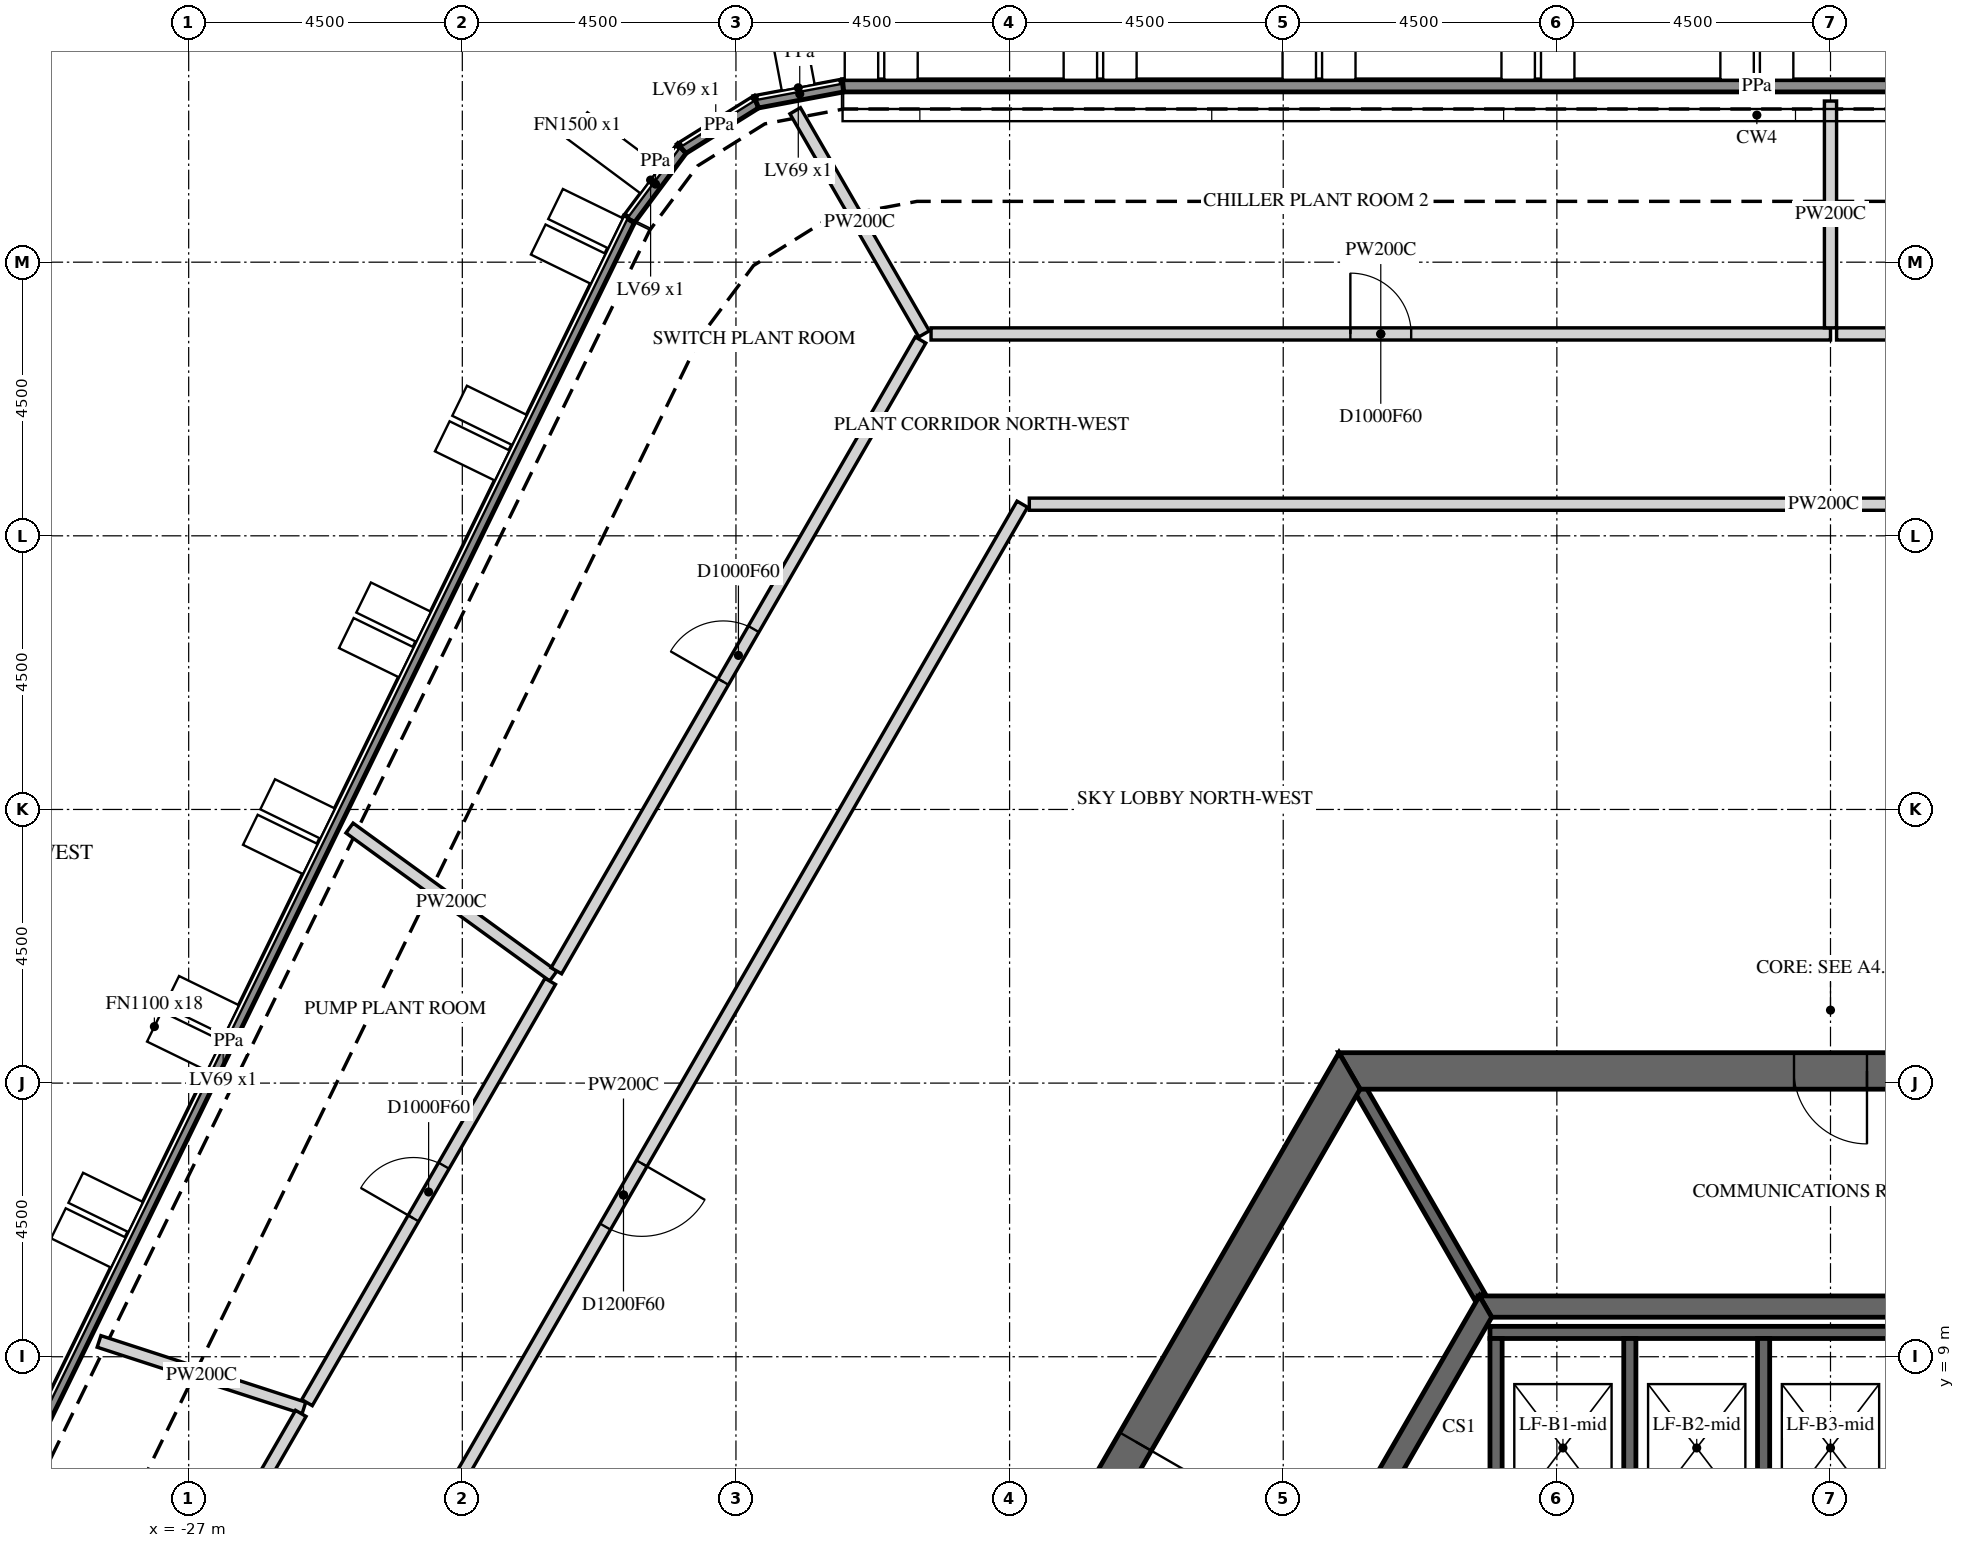
"""IFC4 building model, lengths in metres.
Left out: names, types, materials, properties, quantities, classifications, styles, units other than length and angle.
Written with IfcOpenShell. Run it as: python <this file> out.ifc"""

import sys

from ifc_helpers import new_model, si_unit, direction, frame, frame_2d, origin, place, context, subcontext, project, spatial, polyline, rectangle, outline, extrude, element, fill, save


model = new_model("IFC4")
c1 = context("Model", 3, precision=1e-05, world=origin(), true_north=direction((0.0, 1.0)))
c2 = subcontext(c1, "Body", "Model", "MODEL_VIEW")
j1 = project(units=[si_unit("LENGTHUNIT", "METRE"), si_unit("PLANEANGLEUNIT", "RADIAN")], contexts=[c1])
p1 = place(None, origin())
s1 = spatial("IfcSite", under=j1, at=p1, CompositionType="ELEMENT")
p2 = place(p1, origin())
s2 = spatial("IfcBuilding", under=s1, at=p2, CompositionType="ELEMENT")
p3 = place(p2, frame((0.0, 0.0, 146.7)))
s3 = spatial("IfcBuildingStorey", under=s2, at=p3, CompositionType="ELEMENT", Elevation=146.7)
p4 = place(p3, frame((-32.931, 0.689, 5.7), z_axis=(0.0, 0.0, 1.0), x_axis=(0.438369694316, 0.898794754716, 0.0)))
e1 = element("IfcWall", 1, at=p4, inside=s3, PredefinedType="PARAPET", context=c2, shape_type="SweptSolid", body=[
    extrude(outline(polyline([(0.008, -0.1), (30.044, -0.1), (30.063, 0.1), (-0.008, 0.1), (0.008, -0.1)])), origin(), (0.0, 0.0, 1.0), 1.1),
])
p5 = place(p3, frame((-19.756, 27.701, 5.7), z_axis=(0.0, 0.0, 1.0), x_axis=(0.597118923952, 0.802152722777, 0.0)))
e2 = element("IfcWall", 2, at=p5, inside=s3, PredefinedType="PARAPET", context=c2, shape_type="SweptSolid", body=[
    extrude(outline(polyline([(0.009, -0.1), (1.434, -0.1), (1.471, 0.1), (-0.009, 0.1), (0.009, -0.1)])), origin(), (0.0, 0.0, 1.0), 1.1),
])
p6 = place(p3, frame((-18.889, 28.866, 5.7), z_axis=(0.0, 0.0, 1.0), x_axis=(0.848083831846, 0.529862070884, 0.0)))
e3 = element("IfcWall", 3, at=p6, inside=s3, PredefinedType="PARAPET", context=c2, shape_type="SweptSolid", body=[
    extrude(outline(polyline([(0.019, -0.1), (1.424, -0.1), (1.462, 0.1), (-0.019, 0.1), (0.019, -0.1)])), origin(), (0.0, 0.0, 1.0), 1.1),
])
p7 = place(p3, frame((-17.665, 29.631, 5.7), z_axis=(0.0, 0.0, 1.0), x_axis=(0.982729187844, 0.185049570005, 0.0)))
e4 = element("IfcWall", 4, at=p7, inside=s3, PredefinedType="PARAPET", context=c2, shape_type="SweptSolid", body=[
    extrude(outline(polyline([(0.019, -0.1), (1.443, -0.1), (1.462, 0.1), (-0.019, 0.1), (0.019, -0.1)])), origin(), (0.0, 0.0, 1.0), 1.1),
])
p8 = place(p3, frame((-16.237, 29.9, 5.7), z_axis=(0.0, 0.0, 1.0), x_axis=(1.0, 0.0, 0.0)))
e5 = element("IfcWall", 5, at=p8, inside=s3, PredefinedType="PARAPET", context=c2, shape_type="SweptSolid", body=[
    extrude(outline(polyline([(0.009, -0.1), (30.045, -0.1), (30.062, 0.1), (-0.009, 0.1), (0.009, -0.1)])), origin(), (0.0, 0.0, 1.0), 1.1),
])
p9 = place(p3, frame((-7.91, 13.7, -0.3), z_axis=(0.0, 0.0, 1.0), x_axis=(-0.499999880136, -0.866025472988, 0.0)))
e6 = element("IfcWall", 6, at=p9, inside=s3, PredefinedType="SHEAR", context=c2, shape_type="SweptSolid", body=[
    extrude(outline(polyline([(-0.173, -0.3), (15.993, -0.3), (15.646, 0.3), (0.173, 0.3), (-0.173, -0.3)])), origin(), (0.0, 0.0, 1.0), 5.8),
])
p10 = place(p9, frame((7.039, 0.0, 0.3)))
e7 = element("IfcOpeningElement", 7, at=p10, cuts=e6, PredefinedType="OPENING", context=c2, shape_type="SweptSolid", body=[
    extrude(rectangle(XDim=1.8, YDim=2.4, at=frame_2d((0.9, 1.2))), frame((0.0, 0.31, 0.0), z_axis=(0.0, -1.0, 0.0), x_axis=(1.0, 0.0, 0.0)), (0.0, 0.0, 1.0), 0.62),
])
p11 = place(p3, frame((7.91, 13.7, -0.3), z_axis=(0.0, 0.0, 1.0), x_axis=(-1.0, 0.0, 0.0)))
e8 = element("IfcWall", 8, at=p11, inside=s3, PredefinedType="SHEAR", context=c2, shape_type="SweptSolid", body=[
    extrude(outline(polyline([(-0.173, -0.3), (15.993, -0.3), (15.646, 0.3), (0.173, 0.3), (-0.173, -0.3)])), origin(), (0.0, 0.0, 1.0), 5.8),
])
p12 = place(p11, frame((7.31, 0.0, 0.3)))
e9 = element("IfcOpeningElement", 9, at=p12, cuts=e8, PredefinedType="OPENING", context=c2, shape_type="SweptSolid", body=[
    extrude(rectangle(XDim=1.2, YDim=2.4, at=frame_2d((0.6, 1.2))), frame((0.0, 0.31, 0.0), z_axis=(0.0, -1.0, 0.0), x_axis=(1.0, 0.0, 0.0)), (0.0, 0.0, 1.0), 0.62),
])
p13 = place(p3, frame((-5.673, 9.825, -0.3), z_axis=(0.0, 0.0, 1.0), x_axis=(-0.499995046907, -0.866028263435, 0.0)))
e10 = element("IfcWall", 10, at=p13, inside=s3, PredefinedType="SHEAR", context=c2, shape_type="SweptSolid", body=[
    extrude(outline(polyline([(-0.101, -0.175), (11.446, -0.175), (11.244, 0.175), (0.101, 0.175), (-0.101, -0.175)])), origin(), (0.0, 0.0, 1.0), 5.8),
])
p14 = place(p13, frame((4.801, 0.0, 0.3)))
e11 = element("IfcOpeningElement", 11, at=p14, cuts=e10, PredefinedType="OPENING", context=c2, shape_type="SweptSolid", body=[
    extrude(rectangle(XDim=1.8, YDim=2.4, at=frame_2d((0.9, 1.2))), frame((0.0, 0.185, 0.0), z_axis=(0.0, -1.0, 0.0), x_axis=(1.0, 0.0, 0.0)), (0.0, 0.0, 1.0), 0.37),
])
p15 = place(p3, frame((5.673, 9.825, -0.3), z_axis=(0.0, 0.0, 1.0), x_axis=(-1.0, 0.0, 0.0)))
e12 = element("IfcWall", 12, at=p15, inside=s3, PredefinedType="SHEAR", context=c2, shape_type="SweptSolid", body=[
    extrude(outline(polyline([(-0.101, -0.175), (11.446, -0.175), (11.244, 0.175), (0.101, 0.175), (-0.101, -0.175)])), origin(), (0.0, 0.0, 1.0), 5.8),
])
p16 = place(p3, frame((-5.6, 9.4, -0.25), z_axis=(0.0, 0.0, 1.0), x_axis=(1.0, 0.0, 0.0)))
e13 = element("IfcWall", 13, at=p16, inside=s3, PredefinedType="SHEAR", context=c2, shape_type="SweptSolid", body=[
    extrude(rectangle(XDim=11.2, YDim=0.2, at=frame_2d((5.6, 0.0))), origin(), (0.0, 0.0, 1.0), 5.75),
])
for number, where, z_axis, x_axis in (
    (14, (-5.5, 6.4, -0.25), (0.0, 0.0, 1.0), (0.0, 1.0, 0.0)),
    (15, (-3.3, 6.4, -0.25), (0.0, 0.0, 1.0), (0.0, 1.0, 0.0)),
    (16, (-1.1, 6.4, -0.25), (0.0, 0.0, 1.0), (0.0, 1.0, 0.0)),
):
    element("IfcWall", number, at=place(p3, frame(where, z_axis=z_axis, x_axis=x_axis)), inside=s3, PredefinedType="SHEAR", context=c2, shape_type="SweptSolid", body=[
        extrude(rectangle(XDim=2.9, YDim=0.2, at=frame_2d((1.45, 0.0))), origin(), (0.0, 0.0, 1.0), 5.75),
    ])
p17 = place(p3, frame((-5.773, 10.0, -0.3), z_axis=(0.0, 0.0, 1.0), x_axis=(-0.500038251005, 0.86600331843, 0.0)))
e17 = element("IfcWall", 17, at=p17, inside=s3, PredefinedType="SHEAR", context=c2, shape_type="SweptSolid", body=[
    extrude(rectangle(XDim=3.926, YDim=0.2, at=frame_2d((1.963, 0.0))), origin(), (0.0, 0.0, 1.0), 5.8),
])
p18 = place(p3, frame((-28.474, 9.252, 0.0), z_axis=(0.0, 0.0, 1.0), x_axis=(0.95105432493, -0.309023738622, 0.0)))
e18 = element("IfcWall", 18, at=p18, inside=s3, PredefinedType="PARTITIONING", context=c2, shape_type="SweptSolid", body=[
    extrude(rectangle(XDim=3.542, YDim=0.2, at=frame_2d((1.771, 0.0))), origin(), (0.0, 0.0, 1.0), 5.5),
])
p19 = place(p3, frame((-29.641, 0.3, 0.0), z_axis=(0.0, 0.0, 1.0), x_axis=(0.500005956145, 0.866021964975, 0.0)))
e19 = element("IfcWall", 19, at=p19, inside=s3, PredefinedType="PARTITIONING", context=c2, shape_type="SweptSolid", body=[
    extrude(rectangle(XDim=8.97, YDim=0.2, at=frame_2d((4.485, 0.0))), origin(), (0.0, 0.0, 1.0), 5.5),
])
p20 = place(p19, frame((3.985, 0.0, 0.0)))
e20 = element("IfcOpeningElement", 20, at=p20, cuts=e19, PredefinedType="OPENING", context=c2, shape_type="SweptSolid", body=[
    extrude(rectangle(XDim=1.0, YDim=2.1, at=frame_2d((0.5, 1.05))), frame((0.0, 0.11, 0.0), z_axis=(0.0, -1.0, 0.0), x_axis=(1.0, 0.0, 0.0)), (0.0, 0.0, 1.0), 0.22),
])
p21 = place(p3, frame((-24.355, 17.695, 0.0), z_axis=(0.0, 0.0, 1.0), x_axis=(0.809011281795, -0.587793114904, 0.0)))
e21 = element("IfcWall", 21, at=p21, inside=s3, PredefinedType="PARTITIONING", context=c2, shape_type="SweptSolid", body=[
    extrude(rectangle(XDim=4.142, YDim=0.2, at=frame_2d((2.071, 0.0))), origin(), (0.0, 0.0, 1.0), 5.5),
])
p22 = place(p3, frame((-25.054, 8.246, 0.0), z_axis=(0.0, 0.0, 1.0), x_axis=(0.50002892151, 0.866008705299, 0.0)))
e22 = element("IfcWall", 22, at=p22, inside=s3, PredefinedType="PARTITIONING", context=c2, shape_type="SweptSolid", body=[
    extrude(rectangle(XDim=7.999, YDim=0.2, at=frame_2d((4.0, 0.0))), origin(), (0.0, 0.0, 1.0), 5.5),
])
p23 = place(p22, frame((3.5, 0.0, 0.0)))
e23 = element("IfcOpeningElement", 23, at=p23, cuts=e22, PredefinedType="OPENING", context=c2, shape_type="SweptSolid", body=[
    extrude(rectangle(XDim=1.0, YDim=2.1, at=frame_2d((0.5, 1.05))), frame((0.0, 0.11, 0.0), z_axis=(0.0, -1.0, 0.0), x_axis=(1.0, 0.0, 0.0)), (0.0, 0.0, 1.0), 0.22),
])
p24 = place(p3, frame((-17.026, 29.49, 0.0), z_axis=(0.0, 0.0, 1.0), x_axis=(0.49998675294, -0.866033051843, 0.0)))
e24 = element("IfcWall", 24, at=p24, inside=s3, PredefinedType="PARTITIONING", context=c2, shape_type="SweptSolid", body=[
    extrude(rectangle(XDim=4.238, YDim=0.2, at=frame_2d((2.119, 0.0))), origin(), (0.0, 0.0, 1.0), 5.5),
])
p25 = place(p3, frame((-20.954, 15.347, 0.0), z_axis=(0.0, 0.0, 1.0), x_axis=(0.500001820933, 0.866024352466, 0.0)))
e25 = element("IfcWall", 25, at=p25, inside=s3, PredefinedType="PARTITIONING", context=c2, shape_type="SweptSolid", body=[
    extrude(rectangle(XDim=11.978, YDim=0.2, at=frame_2d((5.989, 0.0))), origin(), (0.0, 0.0, 1.0), 5.5),
])
p26 = place(p25, frame((5.489, 0.0, 0.0)))
e26 = element("IfcOpeningElement", 26, at=p26, cuts=e25, PredefinedType="OPENING", context=c2, shape_type="SweptSolid", body=[
    extrude(rectangle(XDim=1.0, YDim=2.1, at=frame_2d((0.5, 1.05))), frame((0.0, 0.11, 0.0), z_axis=(0.0, -1.0, 0.0), x_axis=(1.0, 0.0, 0.0)), (0.0, 0.0, 1.0), 0.22),
])
p27 = place(p3, frame((-13.291, 23.02, 0.0), z_axis=(0.0, 0.0, 1.0), x_axis=(-0.499987482804, -0.86603263047, 0.0)))
e27 = element("IfcWall", 27, at=p27, inside=s3, PredefinedType="PARTITIONING", context=c2, shape_type="SweptSolid", body=[
    extrude(rectangle(XDim=26.235, YDim=0.2, at=frame_2d((13.117, 0.0))), origin(), (0.0, 0.0, 1.0), 5.5),
])
p28 = place(p27, frame((12.517, 0.0, 0.0)))
e28 = element("IfcOpeningElement", 28, at=p28, cuts=e27, PredefinedType="OPENING", context=c2, shape_type="SweptSolid", body=[
    extrude(rectangle(XDim=1.2, YDim=2.1, at=frame_2d((0.6, 1.05))), frame((0.0, 0.11, 0.0), z_axis=(0.0, -1.0, 0.0), x_axis=(1.0, 0.0, 0.0)), (0.0, 0.0, 1.0), 0.22),
])
p29 = place(p3, frame((-14.792, 25.82, 0.0), z_axis=(0.0, 0.0, 1.0), x_axis=(1.0, 0.0, 0.0)))
e29 = element("IfcWall", 29, at=p29, inside=s3, PredefinedType="PARTITIONING", context=c2, shape_type="SweptSolid", body=[
    extrude(rectangle(XDim=14.792, YDim=0.2, at=frame_2d((7.396, 0.0))), origin(), (0.0, 0.0, 1.0), 5.5),
])
p30 = place(p29, frame((6.896, 0.0, 0.0)))
e30 = element("IfcOpeningElement", 30, at=p30, cuts=e29, PredefinedType="OPENING", context=c2, shape_type="SweptSolid", body=[
    extrude(rectangle(XDim=1.0, YDim=2.1, at=frame_2d((0.5, 1.05))), frame((0.0, 0.11, 0.0), z_axis=(0.0, -1.0, 0.0), x_axis=(1.0, 0.0, 0.0)), (0.0, 0.0, 1.0), 0.22),
])
p31 = place(p3, frame((0.0, 29.65, 0.0), z_axis=(0.0, 0.0, 1.0), x_axis=(0.0, -1.0, 0.0)))
e31 = element("IfcWall", 31, at=p31, inside=s3, PredefinedType="PARTITIONING", context=c2, shape_type="SweptSolid", body=[
    extrude(rectangle(XDim=3.73, YDim=0.2, at=frame_2d((1.865, 0.0))), origin(), (0.0, 0.0, 1.0), 5.5),
])
p32 = place(p3, frame((12.944, 23.02, 0.0), z_axis=(0.0, 0.0, 1.0), x_axis=(-1.0, 0.0, 0.0)))
e32 = element("IfcWall", 32, at=p32, inside=s3, PredefinedType="PARTITIONING", context=c2, shape_type="SweptSolid", body=[
    extrude(rectangle(XDim=26.12, YDim=0.2, at=frame_2d((13.06, 0.0))), origin(), (0.0, 0.0, 1.0), 5.5),
])
p33 = place(p3, frame((0.1, 25.82, 0.0), z_axis=(0.0, 0.0, 1.0), x_axis=(1.0, 0.0, 0.0)))
e33 = element("IfcWall", 33, at=p33, inside=s3, PredefinedType="PARTITIONING", context=c2, shape_type="SweptSolid", body=[
    extrude(rectangle(XDim=14.461, YDim=0.2, at=frame_2d((7.23, 0.0))), origin(), (0.0, 0.0, 1.0), 5.5),
])
p34 = place(p33, frame((6.73, 0.0, 0.0)))
e34 = element("IfcOpeningElement", 34, at=p34, cuts=e33, PredefinedType="OPENING", context=c2, shape_type="SweptSolid", body=[
    extrude(rectangle(XDim=1.0, YDim=2.1, at=frame_2d((0.5, 1.05))), frame((0.0, 0.11, 0.0), z_axis=(0.0, -1.0, 0.0), x_axis=(1.0, 0.0, 0.0)), (0.0, 0.0, 1.0), 0.22),
])
p35 = place(p10, origin())
e35 = element("IfcDoor", 35, at=p35, inside=s3, OperationType="DOUBLE_DOOR_SINGLE_SWING", PredefinedType="DOOR", context=c2, shape_type="SweptSolid", body=[
    extrude(rectangle(XDim=1.8, YDim=2.4, at=frame_2d((0.9, 1.2))), frame((0.0, 0.025, 0.0), z_axis=(0.0, -1.0, 0.0), x_axis=(1.0, 0.0, 0.0)), (0.0, 0.0, 1.0), 0.05),
])
fill(e7, e35)
p36 = place(p12, origin())
e36 = element("IfcDoor", 36, at=p36, inside=s3, OperationType="SINGLE_SWING_LEFT", PredefinedType="DOOR", context=c2, shape_type="SweptSolid", body=[
    extrude(rectangle(XDim=1.2, YDim=2.4, at=frame_2d((0.6, 1.2))), frame((0.0, 0.025, 0.0), z_axis=(0.0, -1.0, 0.0), x_axis=(1.0, 0.0, 0.0)), (0.0, 0.0, 1.0), 0.05),
])
fill(e9, e36)
p37 = place(p23, origin())
e37 = element("IfcDoor", 37, at=p37, inside=s3, OperationType="SINGLE_SWING_LEFT", PredefinedType="DOOR", context=c2, shape_type="SweptSolid", body=[
    extrude(rectangle(XDim=1.0, YDim=2.1, at=frame_2d((0.5, 1.05))), frame((0.0, 0.025, 0.0), z_axis=(0.0, -1.0, 0.0), x_axis=(1.0, 0.0, 0.0)), (0.0, 0.0, 1.0), 0.05),
])
fill(e23, e37)
p38 = place(p26, origin())
e38 = element("IfcDoor", 38, at=p38, inside=s3, OperationType="SINGLE_SWING_RIGHT", PredefinedType="DOOR", context=c2, shape_type="SweptSolid", body=[
    extrude(rectangle(XDim=1.0, YDim=2.1, at=frame_2d((0.5, 1.05))), frame((0.0, 0.025, 0.0), z_axis=(0.0, -1.0, 0.0), x_axis=(1.0, 0.0, 0.0)), (0.0, 0.0, 1.0), 0.05),
])
fill(e26, e38)
p39 = place(p28, origin())
e39 = element("IfcDoor", 39, at=p39, inside=s3, OperationType="SINGLE_SWING_LEFT", PredefinedType="DOOR", context=c2, shape_type="SweptSolid", body=[
    extrude(rectangle(XDim=1.2, YDim=2.1, at=frame_2d((0.6, 1.05))), frame((0.0, 0.025, 0.0), z_axis=(0.0, -1.0, 0.0), x_axis=(1.0, 0.0, 0.0)), (0.0, 0.0, 1.0), 0.05),
])
fill(e28, e39)
p40 = place(p30, origin())
e40 = element("IfcDoor", 40, at=p40, inside=s3, OperationType="SINGLE_SWING_LEFT", PredefinedType="DOOR", context=c2, shape_type="SweptSolid", body=[
    extrude(rectangle(XDim=1.0, YDim=2.1, at=frame_2d((0.5, 1.05))), frame((0.0, 0.025, 0.0), z_axis=(0.0, -1.0, 0.0), x_axis=(1.0, 0.0, 0.0)), (0.0, 0.0, 1.0), 0.05),
])
fill(e30, e40)
save(model, sys.argv[1])
